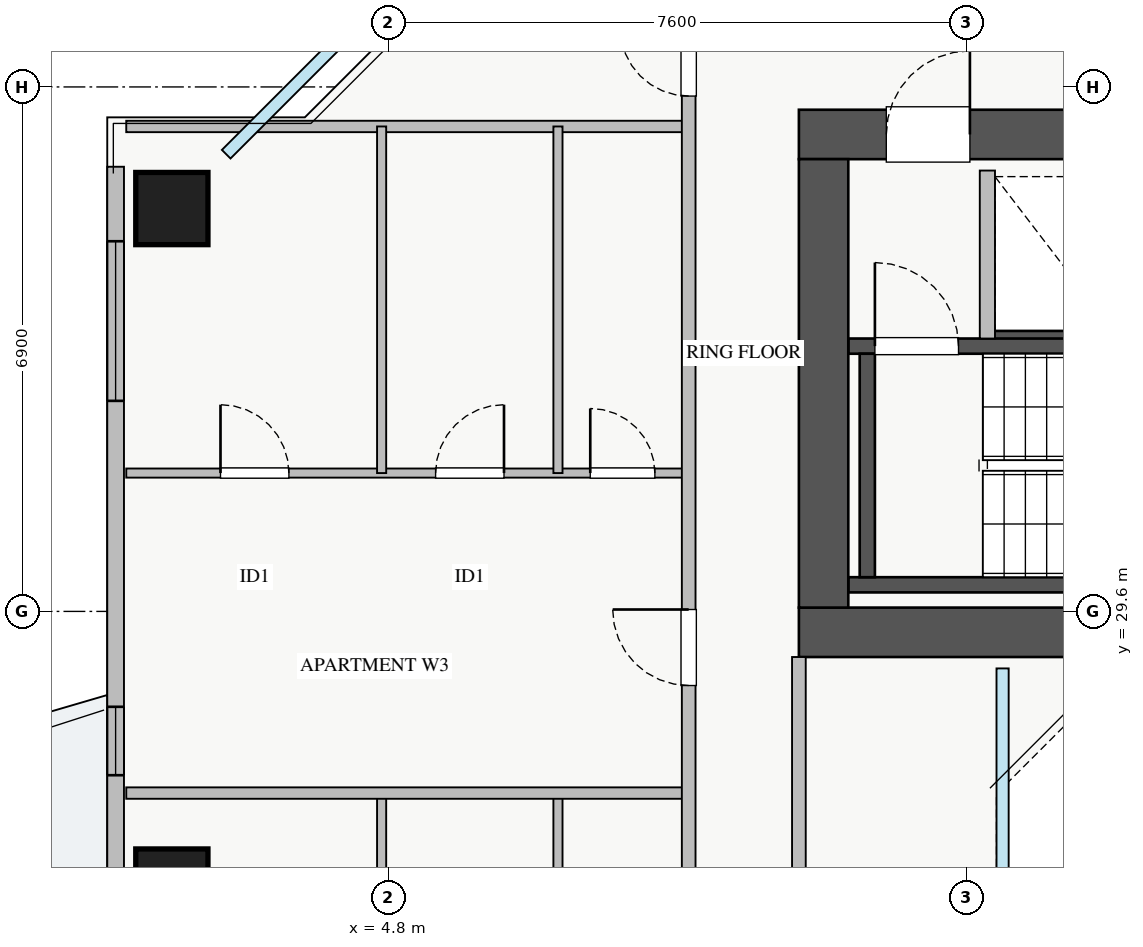
"""IFC4 building model, lengths in metres.
Left out: names, types, materials, properties, quantities, classifications, styles, units other than length and angle.
Written with IfcOpenShell. Run it as: python <this file> out.ifc"""

import sys

from ifc_helpers import new_model, si_unit, direction, frame, frame_2d, origin, origin_2d, place, context, subcontext, project, spatial, rectangle, extrude, source, transform, mapped, element, fill, save


model = new_model("IFC4")
c1 = context("Model", 3, precision=1e-05, world=origin(), true_north=direction((0.0, 1.0)))
c2 = subcontext(c1, "Body", "Model", "MODEL_VIEW")
j1 = project(units=[si_unit("LENGTHUNIT", "METRE"), si_unit("PLANEANGLEUNIT", "RADIAN")], contexts=[c1])
p1 = place(None, origin())
s1 = spatial("IfcSite", under=j1, at=p1, CompositionType="ELEMENT")
p2 = place(p1, origin())
s2 = spatial("IfcBuilding", under=s1, at=p2, CompositionType="ELEMENT")
p3 = place(p2, frame((0.0, 0.0, 147.0)))
s3 = spatial("IfcBuildingStorey", under=s2, at=p3, CompositionType="ELEMENT", Elevation=147.0)
p4 = place(p3, frame((12.68, 33.2, 0.0), z_axis=(0.0, 0.0, 1.0), x_axis=(1.0, 0.0, 0.0)))
e1 = element("IfcWall", 1, at=p4, inside=s3, PredefinedType="SHEAR", context=c2, shape_type="SweptSolid", body=[
    extrude(rectangle(XDim=1.94, YDim=0.18, at=frame_2d((0.97, 0.0))), origin(), (0.0, 0.0, 1.0), 3.07),
])
p5 = place(p3, frame((10.85, 29.95, 0.0), z_axis=(0.0, 0.0, 1.0), x_axis=(1.0, 0.0, 0.0)))
e2 = element("IfcWall", 2, at=p5, inside=s3, PredefinedType="SHEAR", context=c2, shape_type="SweptSolid", body=[
    extrude(rectangle(XDim=7.3, YDim=0.2, at=frame_2d((3.65, 0.0))), origin(), (0.0, 0.0, 1.0), 3.25),
])
p6 = place(p3, frame((10.85, 33.09, 0.0), z_axis=(0.0, 0.0, 1.0), x_axis=(1.0, 0.0, 0.0)))
e3 = element("IfcWall", 3, at=p6, inside=s3, PredefinedType="SHEAR", context=c2, shape_type="SweptSolid", body=[
    extrude(rectangle(XDim=7.3, YDim=0.2, at=frame_2d((3.65, 0.0))), origin(), (0.0, 0.0, 1.0), 3.25),
])
p7 = place(p6, frame((0.35, 0.0, 0.0)))
e4 = element("IfcOpeningElement", 4, at=p7, cuts=e3, PredefinedType="OPENING", context=c2, shape_type="SweptSolid", body=[
    extrude(rectangle(XDim=1.1, YDim=2.05, at=frame_2d((0.55, 1.025))), frame((0.0, 0.11, 0.0), z_axis=(0.0, -1.0, 0.0), x_axis=(1.0, 0.0, 0.0)), (0.0, 0.0, 1.0), 0.22),
])
p8 = place(p3, frame((11.1, 30.05, 0.0), z_axis=(0.0, 0.0, 1.0), x_axis=(0.0, 1.0, 0.0)))
e5 = element("IfcWall", 5, at=p8, inside=s3, PredefinedType="SHEAR", context=c2, shape_type="SweptSolid", body=[
    extrude(rectangle(XDim=2.94, YDim=0.2, at=frame_2d((1.47, 0.0))), origin(), (0.0, 0.0, 1.0), 3.25),
])
p9 = place(p3, frame((10.2, 29.325, 0.0), z_axis=(0.0, 0.0, 1.0), x_axis=(1.0, 0.0, 0.0)))
e6 = element("IfcWall", 6, at=p9, inside=s3, PredefinedType="SHEAR", context=c2, shape_type="SweptSolid", body=[
    extrude(rectangle(XDim=17.6, YDim=0.65, at=frame_2d((8.8, 0.0))), origin(), (0.0, 0.0, 1.0), 3.25),
])
p10 = place(p3, frame((10.2, 35.875, 0.0), z_axis=(0.0, 0.0, 1.0), x_axis=(1.0, 0.0, 0.0)))
e7 = element("IfcWall", 7, at=p10, inside=s3, PredefinedType="SHEAR", context=c2, shape_type="SweptSolid", body=[
    extrude(rectangle(XDim=17.6, YDim=0.65, at=frame_2d((8.8, 0.0))), origin(), (0.0, 0.0, 1.0), 3.25),
])
p11 = place(p10, frame((1.15, 0.0, 0.0)))
e8 = element("IfcOpeningElement", 8, at=p11, cuts=e7, PredefinedType="OPENING", context=c2, shape_type="SweptSolid", body=[
    extrude(rectangle(XDim=1.1, YDim=2.05, at=frame_2d((0.55, 1.025))), frame((0.0, 0.335, 0.0), z_axis=(0.0, -1.0, 0.0), x_axis=(1.0, 0.0, 0.0)), (0.0, 0.0, 1.0), 0.67),
])
p12 = place(p10, frame((8.3, 0.0, 0.0)))
e9 = element("IfcOpeningElement", 9, at=p12, cuts=e7, PredefinedType="OPENING", context=c2, shape_type="SweptSolid", body=[
    extrude(rectangle(XDim=1.1, YDim=2.05, at=frame_2d((0.55, 1.025))), frame((0.0, 0.335, 0.0), z_axis=(0.0, -1.0, 0.0), x_axis=(1.0, 0.0, 0.0)), (0.0, 0.0, 1.0), 0.67),
])
p13 = place(p10, frame((4.9, 0.0, 0.0)))
e10 = element("IfcOpeningElement", 10, at=p13, cuts=e7, PredefinedType="OPENING", context=c2, shape_type="SweptSolid", body=[
    extrude(rectangle(XDim=1.1, YDim=2.05, at=frame_2d((0.55, 1.025))), frame((0.0, 0.335, 0.0), z_axis=(0.0, -1.0, 0.0), x_axis=(1.0, 0.0, 0.0)), (0.0, 0.0, 1.0), 0.67),
])
p14 = place(p10, frame((14.74, 0.0, 0.0)))
e11 = element("IfcOpeningElement", 11, at=p14, cuts=e7, PredefinedType="OPENING", context=c2, shape_type="SweptSolid", body=[
    extrude(rectangle(XDim=1.0, YDim=2.05, at=frame_2d((0.5, 1.025))), frame((0.0, 0.335, 0.0), z_axis=(0.0, -1.0, 0.0), x_axis=(1.0, 0.0, 0.0)), (0.0, 0.0, 1.0), 0.67),
])
p15 = place(p10, frame((10.175, 0.0, 0.0)))
e12 = element("IfcOpeningElement", 12, at=p15, cuts=e7, PredefinedType="OPENING", context=c2, shape_type="SweptSolid", body=[
    extrude(rectangle(XDim=1.0, YDim=2.05, at=frame_2d((0.5, 1.025))), frame((0.0, 0.335, 0.0), z_axis=(0.0, -1.0, 0.0), x_axis=(1.0, 0.0, 0.0)), (0.0, 0.0, 1.0), 0.67),
])
p16 = place(p10, frame((12.625, 0.0, 0.0)))
e13 = element("IfcOpeningElement", 13, at=p16, cuts=e7, PredefinedType="OPENING", context=c2, shape_type="SweptSolid", body=[
    extrude(rectangle(XDim=1.0, YDim=2.05, at=frame_2d((0.5, 1.025))), frame((0.0, 0.335, 0.0), z_axis=(0.0, -1.0, 0.0), x_axis=(1.0, 0.0, 0.0)), (0.0, 0.0, 1.0), 0.67),
])
p17 = place(p3, frame((10.525, 29.65, 0.0), z_axis=(0.0, 0.0, 1.0), x_axis=(0.0, 1.0, 0.0)))
e14 = element("IfcWall", 14, at=p17, inside=s3, PredefinedType="SHEAR", context=c2, shape_type="SweptSolid", body=[
    extrude(rectangle(XDim=5.9, YDim=0.65, at=frame_2d((2.95, 0.0))), origin(), (0.0, 0.0, 1.0), 3.25),
])
m1 = source(origin(), c2, "Body", "SweptSolid", [
    extrude(rectangle(XDim=0.95, YDim=0.95, at=origin_2d()), origin(), (0.0, 0.0, 1.0), 3.25),
])
for number, where, z_axis, x_axis in (
    (15, (1.95, 34.9, 0.0), (0.0, 0.0, 1.0), (1.0, 0.0, 0.0)),
    (16, (1.95, 26.0, 0.0), (0.0, 0.0, 1.0), (1.0, 0.0, 0.0)),
):
    element("IfcColumn", number, at=place(p3, frame(where, z_axis=z_axis, x_axis=x_axis)), inside=s3, PredefinedType="COLUMN", context=c2, shape_type="MappedRepresentation", body=[
        mapped(m1, transform((0.0, 0.0, 0.0), x_axis=(1.0, 0.0, 0.0), y_axis=(0.0, 1.0, 0.0), z_axis=(0.0, 0.0, 1.0), scale=1.0)),
    ])
p18 = place(p3, frame((1.21, 10.55, 0.0), z_axis=(0.0, 0.0, 1.0), x_axis=(0.0, 1.0, 0.0)))
e17 = element("IfcWall", 17, at=p18, inside=s3, PredefinedType="STANDARD", context=c2, shape_type="SweptSolid", body=[
    extrude(rectangle(XDim=24.9, YDim=0.22, at=frame_2d((12.45, 0.0))), origin(), (0.0, 0.0, 1.0), 2.61),
])
p19 = place(p18, frame((13.3, 0.0, 0.0)))
e18 = element("IfcOpeningElement", 18, at=p19, cuts=e17, PredefinedType="OPENING", context=c2, shape_type="SweptSolid", body=[
    extrude(rectangle(XDim=1.2, YDim=2.1, at=frame_2d((0.6, 1.05))), frame((0.0, 0.12, 0.0), z_axis=(0.0, -1.0, 0.0), x_axis=(1.0, 0.0, 0.0)), (0.0, 0.0, 1.0), 0.24),
])
p20 = place(p18, frame((1.912, 0.0, 0.9)))
e19 = element("IfcOpeningElement", 19, at=p20, cuts=e17, PredefinedType="OPENING", context=c2, shape_type="SweptSolid", body=[
    extrude(rectangle(XDim=2.4, YDim=1.48, at=frame_2d((1.2, 0.74))), frame((0.0, 0.12, 0.0), z_axis=(0.0, -1.0, 0.0), x_axis=(1.0, 0.0, 0.0)), (0.0, 0.0, 1.0), 0.24),
])
p21 = place(p18, frame((21.82, 0.0, 0.9)))
e20 = element("IfcOpeningElement", 20, at=p21, cuts=e17, PredefinedType="OPENING", context=c2, shape_type="SweptSolid", body=[
    extrude(rectangle(XDim=2.1, YDim=1.5, at=frame_2d((1.05, 0.75))), frame((0.0, 0.12, 0.0), z_axis=(0.0, -1.0, 0.0), x_axis=(1.0, 0.0, 0.0)), (0.0, 0.0, 1.0), 0.24),
])
p22 = place(p18, frame((12.05, 0.0, 0.9)))
e21 = element("IfcOpeningElement", 21, at=p22, cuts=e17, PredefinedType="OPENING", context=c2, shape_type="SweptSolid", body=[
    extrude(rectangle(XDim=0.9, YDim=1.2, at=frame_2d((0.45, 0.6))), frame((0.0, 0.12, 0.0), z_axis=(0.0, -1.0, 0.0), x_axis=(1.0, 0.0, 0.0)), (0.0, 0.0, 1.0), 0.24),
])
p23 = place(p18, frame((7.615, 0.0, 0.9)))
e22 = element("IfcOpeningElement", 22, at=p23, cuts=e17, PredefinedType="OPENING", context=c2, shape_type="SweptSolid", body=[
    extrude(rectangle(XDim=0.9, YDim=1.2, at=frame_2d((0.45, 0.6))), frame((0.0, 0.12, 0.0), z_axis=(0.0, -1.0, 0.0), x_axis=(1.0, 0.0, 0.0)), (0.0, 0.0, 1.0), 0.24),
])
p24 = place(p18, frame((16.895, 0.0, 0.9)))
e23 = element("IfcOpeningElement", 23, at=p24, cuts=e17, PredefinedType="OPENING", context=c2, shape_type="SweptSolid", body=[
    extrude(rectangle(XDim=0.9, YDim=1.2, at=frame_2d((0.45, 0.6))), frame((0.0, 0.12, 0.0), z_axis=(0.0, -1.0, 0.0), x_axis=(1.0, 0.0, 0.0)), (0.0, 0.0, 1.0), 0.24),
])
p25 = place(p3, frame((12.68, 33.19, 0.0), z_axis=(0.0, 0.0, 1.0), x_axis=(0.0, 1.0, 0.0)))
e24 = element("IfcWall", 24, at=p25, inside=s3, PredefinedType="PARTITIONING", context=c2, shape_type="SweptSolid", body=[
    extrude(rectangle(XDim=2.21, YDim=0.2, at=frame_2d((1.105, 0.0))), origin(), (0.0, 0.0, 1.0), 3.07),
])
p26 = place(p3, frame((1.35, 35.98, 0.0), z_axis=(0.0, 0.0, 1.0), x_axis=(1.0, 0.0, 0.0)))
e25 = element("IfcWall", 25, at=p26, inside=s3, PredefinedType="PARTITIONING", context=c2, shape_type="SweptSolid", body=[
    extrude(rectangle(XDim=7.4, YDim=0.15, at=frame_2d((3.7, 0.0))), origin(), (0.0, 0.0, 1.0), 3.07),
])
for number, where, z_axis, x_axis in (
    (26, (4.71, 22.38, 0.0), (0.0, 0.0, 1.0), (0.0, 1.0, 0.0)),
    (27, (7.03, 22.38, 0.0), (0.0, 0.0, 1.0), (0.0, 1.0, 0.0)),
):
    element("IfcWall", number, at=place(p3, frame(where, z_axis=z_axis, x_axis=x_axis)), inside=s3, PredefinedType="PLUMBINGWALL", context=c2, shape_type="SweptSolid", body=[
        extrude(rectangle(XDim=4.83, YDim=0.12, at=frame_2d((2.415, 0.0))), origin(), (0.0, 0.0, 1.0), 3.07),
    ])
p27 = place(p3, frame((1.35, 31.42, 0.0), z_axis=(0.0, 0.0, 1.0), x_axis=(1.0, 0.0, 0.0)))
e28 = element("IfcWall", 28, at=p27, inside=s3, PredefinedType="PLUMBINGWALL", context=c2, shape_type="SweptSolid", body=[
    extrude(rectangle(XDim=7.4, YDim=0.12, at=frame_2d((3.7, 0.0))), origin(), (0.0, 0.0, 1.0), 3.07),
])
p28 = place(p27, frame((1.24, 0.0, 0.0)))
e29 = element("IfcOpeningElement", 29, at=p28, cuts=e28, PredefinedType="OPENING", context=c2, shape_type="SweptSolid", body=[
    extrude(rectangle(XDim=0.9, YDim=2.05, at=frame_2d((0.45, 1.025))), frame((0.0, 0.07, 0.0), z_axis=(0.0, -1.0, 0.0), x_axis=(1.0, 0.0, 0.0)), (0.0, 0.0, 1.0), 0.14),
])
p29 = place(p27, frame((4.07, 0.0, 0.0)))
e30 = element("IfcOpeningElement", 30, at=p29, cuts=e28, PredefinedType="OPENING", context=c2, shape_type="SweptSolid", body=[
    extrude(rectangle(XDim=0.9, YDim=2.05, at=frame_2d((0.45, 1.025))), frame((0.0, 0.07, 0.0), z_axis=(0.0, -1.0, 0.0), x_axis=(1.0, 0.0, 0.0)), (0.0, 0.0, 1.0), 0.14),
])
p30 = place(p27, frame((6.105, 0.0, 0.0)))
e31 = element("IfcOpeningElement", 31, at=p30, cuts=e28, PredefinedType="OPENING", context=c2, shape_type="SweptSolid", body=[
    extrude(rectangle(XDim=0.85, YDim=2.05, at=frame_2d((0.425, 1.025))), frame((0.0, 0.07, 0.0), z_axis=(0.0, -1.0, 0.0), x_axis=(1.0, 0.0, 0.0)), (0.0, 0.0, 1.0), 0.14),
])
p31 = place(p3, frame((4.71, 31.42, 0.0), z_axis=(0.0, 0.0, 1.0), x_axis=(0.0, 1.0, 0.0)))
e32 = element("IfcWall", 32, at=p31, inside=s3, PredefinedType="PLUMBINGWALL", context=c2, shape_type="SweptSolid", body=[
    extrude(rectangle(XDim=4.56, YDim=0.12, at=frame_2d((2.28, 0.0))), origin(), (0.0, 0.0, 1.0), 3.07),
])
p32 = place(p3, frame((7.03, 31.42, 0.0), z_axis=(0.0, 0.0, 1.0), x_axis=(0.0, 1.0, 0.0)))
e33 = element("IfcWall", 33, at=p32, inside=s3, PredefinedType="PLUMBINGWALL", context=c2, shape_type="SweptSolid", body=[
    extrude(rectangle(XDim=4.56, YDim=0.12, at=frame_2d((2.28, 0.0))), origin(), (0.0, 0.0, 1.0), 2.577),
])
p33 = place(p3, frame((1.35, 27.21, 0.0), z_axis=(0.0, 0.0, 1.0), x_axis=(1.0, 0.0, 0.0)))
e34 = element("IfcWall", 34, at=p33, inside=s3, PredefinedType="PARTITIONING", context=c2, shape_type="SweptSolid", body=[
    extrude(rectangle(XDim=7.4, YDim=0.15, at=frame_2d((3.7, 0.0))), origin(), (0.0, 0.0, 1.0), 3.07),
])
p34 = place(p3, frame((8.75, 8.3, 0.0), z_axis=(0.0, 0.0, 1.0), x_axis=(0.0, 1.0, 0.0)))
e35 = element("IfcWall", 35, at=p34, inside=s3, PredefinedType="PARTITIONING", context=c2, shape_type="SweptSolid", body=[
    extrude(rectangle(XDim=29.4, YDim=0.18, at=frame_2d((14.7, 0.0))), origin(), (0.0, 0.0, 1.0), 3.07),
])
p35 = place(p34, frame((28.08, 0.0, 0.0)))
e36 = element("IfcOpeningElement", 36, at=p35, cuts=e35, PredefinedType="OPENING", context=c2, shape_type="SweptSolid", body=[
    extrude(rectangle(XDim=0.9, YDim=2.05, at=frame_2d((0.45, 1.025))), frame((0.0, 0.1, 0.0), z_axis=(0.0, -1.0, 0.0), x_axis=(1.0, 0.0, 0.0)), (0.0, 0.0, 1.0), 0.2),
])
p36 = place(p34, frame((0.245, 0.0, 0.0)))
e37 = element("IfcOpeningElement", 37, at=p36, cuts=e35, PredefinedType="OPENING", context=c2, shape_type="SweptSolid", body=[
    extrude(rectangle(XDim=0.9, YDim=2.05, at=frame_2d((0.45, 1.025))), frame((0.0, 0.1, 0.0), z_axis=(0.0, -1.0, 0.0), x_axis=(1.0, 0.0, 0.0)), (0.0, 0.0, 1.0), 0.2),
])
p37 = place(p34, frame((5.0, 0.0, 0.0)))
e38 = element("IfcOpeningElement", 38, at=p37, cuts=e35, PredefinedType="OPENING", context=c2, shape_type="SweptSolid", body=[
    extrude(rectangle(XDim=1.0, YDim=2.05, at=frame_2d((0.5, 1.025))), frame((0.0, 0.1, 0.0), z_axis=(0.0, -1.0, 0.0), x_axis=(1.0, 0.0, 0.0)), (0.0, 0.0, 1.0), 0.2),
])
p38 = place(p34, frame((11.165, 0.0, 0.0)))
e39 = element("IfcOpeningElement", 39, at=p38, cuts=e35, PredefinedType="OPENING", context=c2, shape_type="SweptSolid", body=[
    extrude(rectangle(XDim=1.0, YDim=2.05, at=frame_2d((0.5, 1.025))), frame((0.0, 0.1, 0.0), z_axis=(0.0, -1.0, 0.0), x_axis=(1.0, 0.0, 0.0)), (0.0, 0.0, 1.0), 0.2),
])
p39 = place(p34, frame((20.325, 0.0, 0.0)))
e40 = element("IfcOpeningElement", 40, at=p39, cuts=e35, PredefinedType="OPENING", context=c2, shape_type="SweptSolid", body=[
    extrude(rectangle(XDim=1.0, YDim=2.05, at=frame_2d((0.5, 1.025))), frame((0.0, 0.1, 0.0), z_axis=(0.0, -1.0, 0.0), x_axis=(1.0, 0.0, 0.0)), (0.0, 0.0, 1.0), 0.2),
])
p40 = place(p3, frame((10.2, 17.0, 0.0), z_axis=(0.0, 0.0, 1.0), x_axis=(0.0, 1.0, 0.0)))
e41 = element("IfcWall", 41, at=p40, inside=s3, PredefinedType="PARTITIONING", context=c2, shape_type="SweptSolid", body=[
    extrude(rectangle(XDim=12.0, YDim=0.18, at=frame_2d((6.0, 0.0))), origin(), (0.0, 0.0, 1.0), 3.07),
])
p41 = place(p40, frame((1.5, 0.0, 0.0)))
e42 = element("IfcOpeningElement", 42, at=p41, cuts=e41, PredefinedType="OPENING", context=c2, shape_type="SweptSolid", body=[
    extrude(rectangle(XDim=0.85, YDim=2.05, at=frame_2d((0.425, 1.025))), frame((0.0, 0.1, 0.0), z_axis=(0.0, -1.0, 0.0), x_axis=(1.0, 0.0, 0.0)), (0.0, 0.0, 1.0), 0.2),
])
p42 = place(p40, frame((6.5, 0.0, 0.0)))
e43 = element("IfcOpeningElement", 43, at=p42, cuts=e41, PredefinedType="OPENING", context=c2, shape_type="SweptSolid", body=[
    extrude(rectangle(XDim=1.0, YDim=2.05, at=frame_2d((0.5, 1.025))), frame((0.0, 0.1, 0.0), z_axis=(0.0, -1.0, 0.0), x_axis=(1.0, 0.0, 0.0)), (0.0, 0.0, 1.0), 0.2),
])
m2 = source(origin(), c2, "Body", "SweptSolid", [
    extrude(rectangle(XDim=2.1, YDim=1.5, at=frame_2d((1.05, 0.75))), frame((0.0, 0.03, 0.0), z_axis=(0.0, -1.0, 0.0), x_axis=(1.0, 0.0, 0.0)), (0.0, 0.0, 1.0), 0.06),
])
p43 = place(p21, origin())
e44 = element("IfcWindow", 44, at=p43, inside=s3, PartitioningType="TRIPLE_PANEL_VERTICAL", PredefinedType="WINDOW", context=c2, shape_type="MappedRepresentation", body=[
    mapped(m2, transform((0.0, 0.0, 0.0), x_axis=(1.0, 0.0, 0.0), y_axis=(0.0, 1.0, 0.0), z_axis=(0.0, 0.0, 1.0), scale=1.0)),
])
fill(e20, e44)
m3 = source(origin(), c2, "Body", "SweptSolid", [
    extrude(rectangle(XDim=1.1, YDim=2.05, at=frame_2d((0.55, 1.025))), frame((0.0, 0.025, 0.0), z_axis=(0.0, -1.0, 0.0), x_axis=(1.0, 0.0, 0.0)), (0.0, 0.0, 1.0), 0.05),
])
p44 = place(p11, origin())
e45 = element("IfcDoor", 45, at=p44, inside=s3, OperationType="SINGLE_SWING_RIGHT", PredefinedType="DOOR", context=c2, shape_type="MappedRepresentation", body=[
    mapped(m3, transform((0.0, 0.0, 0.0), x_axis=(1.0, 0.0, 0.0), y_axis=(0.0, 1.0, 0.0), z_axis=(0.0, 0.0, 1.0), scale=1.0)),
])
fill(e8, e45)
p45 = place(p7, origin())
e46 = element("IfcDoor", 46, at=p45, inside=s3, OperationType="SINGLE_SWING_LEFT", PredefinedType="DOOR", context=c2, shape_type="MappedRepresentation", body=[
    mapped(m3, transform((0.0, 0.0, 0.0), x_axis=(1.0, 0.0, 0.0), y_axis=(0.0, 1.0, 0.0), z_axis=(0.0, 0.0, 1.0), scale=1.0)),
])
fill(e4, e46)
m4 = source(origin(), c2, "Body", "SweptSolid", [
    extrude(rectangle(XDim=0.9, YDim=2.05, at=frame_2d((0.45, 1.025))), frame((0.0, 0.025, 0.0), z_axis=(0.0, -1.0, 0.0), x_axis=(1.0, 0.0, 0.0)), (0.0, 0.0, 1.0), 0.05),
])
p46 = place(p28, origin())
e47 = element("IfcDoor", 47, at=p46, inside=s3, OperationType="SINGLE_SWING_LEFT", PredefinedType="DOOR", context=c2, shape_type="MappedRepresentation", body=[
    mapped(m4, transform((0.0, 0.0, 0.0), x_axis=(1.0, 0.0, 0.0), y_axis=(0.0, 1.0, 0.0), z_axis=(0.0, 0.0, 1.0), scale=1.0)),
])
fill(e29, e47)
p47 = place(p29, origin())
e48 = element("IfcDoor", 48, at=p47, inside=s3, OperationType="SINGLE_SWING_RIGHT", PredefinedType="DOOR", context=c2, shape_type="MappedRepresentation", body=[
    mapped(m4, transform((0.0, 0.0, 0.0), x_axis=(1.0, 0.0, 0.0), y_axis=(0.0, 1.0, 0.0), z_axis=(0.0, 0.0, 1.0), scale=1.0)),
])
fill(e30, e48)
m5 = source(origin(), c2, "Body", "SweptSolid", [
    extrude(rectangle(XDim=0.85, YDim=2.05, at=frame_2d((0.425, 1.025))), frame((0.0, 0.025, 0.0), z_axis=(0.0, -1.0, 0.0), x_axis=(1.0, 0.0, 0.0)), (0.0, 0.0, 1.0), 0.05),
])
p48 = place(p30, origin())
e49 = element("IfcDoor", 49, at=p48, inside=s3, OperationType="SINGLE_SWING_LEFT", PredefinedType="DOOR", context=c2, shape_type="MappedRepresentation", body=[
    mapped(m5, transform((0.0, 0.0, 0.0), x_axis=(1.0, 0.0, 0.0), y_axis=(0.0, 1.0, 0.0), z_axis=(0.0, 0.0, 1.0), scale=1.0)),
])
fill(e31, e49)
p49 = place(p35, origin())
e50 = element("IfcDoor", 50, at=p49, inside=s3, OperationType="SINGLE_SWING_RIGHT", PredefinedType="DOOR", context=c2, shape_type="MappedRepresentation", body=[
    mapped(m4, transform((0.0, 0.0, 0.0), x_axis=(1.0, 0.0, 0.0), y_axis=(0.0, 1.0, 0.0), z_axis=(0.0, 0.0, 1.0), scale=1.0)),
])
fill(e36, e50)
m6 = source(origin(), c2, "Body", "SweptSolid", [
    extrude(rectangle(XDim=1.0, YDim=2.05, at=frame_2d((0.5, 1.025))), frame((0.0, 0.025, 0.0), z_axis=(0.0, -1.0, 0.0), x_axis=(1.0, 0.0, 0.0)), (0.0, 0.0, 1.0), 0.05),
])
p50 = place(p39, origin())
e51 = element("IfcDoor", 51, at=p50, inside=s3, OperationType="SINGLE_SWING_RIGHT", PredefinedType="DOOR", context=c2, shape_type="MappedRepresentation", body=[
    mapped(m6, transform((0.0, 0.0, 0.0), x_axis=(1.0, 0.0, 0.0), y_axis=(0.0, 1.0, 0.0), z_axis=(0.0, 0.0, 1.0), scale=1.0)),
])
fill(e40, e51)
m7 = source(origin(), c2, "Body", "SweptSolid", [
    extrude(rectangle(XDim=0.9, YDim=1.2, at=frame_2d((0.45, 0.6))), frame((0.0, 0.03, 0.0), z_axis=(0.0, -1.0, 0.0), x_axis=(1.0, 0.0, 0.0)), (0.0, 0.0, 1.0), 0.06),
])
p51 = place(p24, origin())
e52 = element("IfcWindow", 52, at=p51, inside=s3, PartitioningType="SINGLE_PANEL", PredefinedType="WINDOW", context=c2, shape_type="MappedRepresentation", body=[
    mapped(m7, transform((0.0, 0.0, 0.0), x_axis=(1.0, 0.0, 0.0), y_axis=(0.0, 1.0, 0.0), z_axis=(0.0, 0.0, 1.0), scale=1.0)),
])
fill(e23, e52)
save(model, sys.argv[1])
